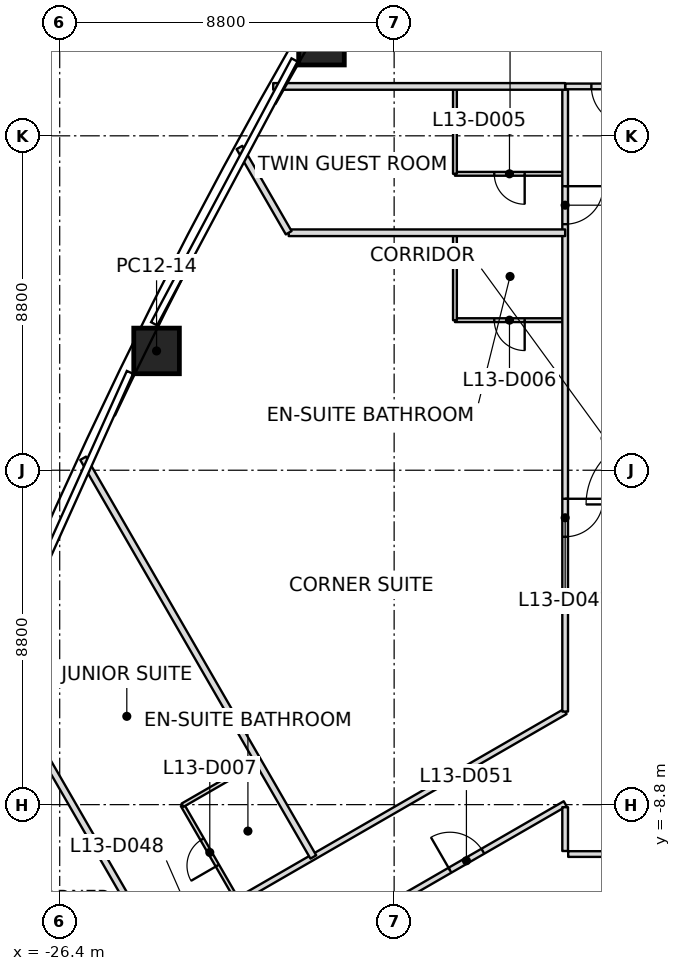
"""IFC4 building model, lengths in metres.
Left out: names, types, materials, properties, quantities, classifications, styles, units other than length and angle.
Written with IfcOpenShell. Run it as: python <this file> out.ifc"""

import sys

from ifc_helpers import new_model, si_unit, direction, frame, frame_2d, origin, origin_2d, place, context, subcontext, project, spatial, rectangle, extrude, element, fill, save


model = new_model("IFC4")
c1 = context("Model", 3, precision=1e-05, world=origin(), true_north=direction((0.0, 1.0)))
c2 = subcontext(c1, "Body", "Model", "MODEL_VIEW")
j1 = project(units=[si_unit("LENGTHUNIT", "METRE"), si_unit("PLANEANGLEUNIT", "RADIAN")], contexts=[c1])
p1 = place(None, origin())
s1 = spatial("IfcSite", under=j1, at=p1, CompositionType="ELEMENT")
p2 = place(p1, origin())
s2 = spatial("IfcBuilding", under=s1, at=p2, CompositionType="ELEMENT")
p3 = place(p2, frame((0.0, 0.0, 70.2)))
s3 = spatial("IfcBuildingStorey", under=s2, at=p3, CompositionType="ELEMENT", Elevation=70.2)
p4 = place(p3, frame((-19.512, 11.265, 0.0), z_axis=(0.010754701703, -0.006136118149, 0.999923339284), x_axis=(0.499971083262, 0.866042095943, -6.290806e-05)))
e1 = element("IfcColumn", 1, at=p4, inside=s3, PredefinedType="COLUMN", context=c2, shape_type="SweptSolid", body=[
    extrude(rectangle(XDim=1.2, YDim=1.2, at=origin_2d()), origin(), (0.0, 0.0, 1.0), 3.7),
])
p5 = place(p3, frame((-23.851, 3.139, 0.0), z_axis=(0.015306644787, 0.002309192102, 0.99988017995), x_axis=(0.441616967633, 0.897160209643, -0.00883244763)))
e2 = element("IfcColumn", 2, at=p5, inside=s3, PredefinedType="COLUMN", context=c2, shape_type="SweptSolid", body=[
    extrude(rectangle(XDim=1.2, YDim=1.2, at=origin_2d()), origin(), (0.0, 0.0, 1.0), 3.7),
])
p6 = place(p3, frame((-23.883, -12.577, 0.0), z_axis=(0.0, 0.0, 1.0), x_axis=(-0.500021453979, 0.866013016969, 0.0)))
e3 = element("IfcWall", 3, at=p6, inside=s3, PredefinedType="PARTITIONING", context=c2, shape_type="SweptSolid", body=[
    extrude(rectangle(XDim=8.576, YDim=0.175, at=frame_2d((4.288, 0.0))), origin(), (0.0, 0.0, 1.0), 2.784),
])
p7 = place(p3, frame((-19.727, -10.177, 0.0), z_axis=(0.0, 0.0, 1.0), x_axis=(-0.499992848968, 0.866029532395, 0.0)))
e4 = element("IfcWall", 4, at=p7, inside=s3, PredefinedType="PARTITIONING", context=c2, shape_type="SweptSolid", body=[
    extrude(rectangle(XDim=12.115, YDim=0.175, at=frame_2d((6.057, 0.0))), origin(), (0.0, 0.0, 1.0), 2.784),
])
p8 = place(p3, frame((-13.1, 6.249, 0.0), z_axis=(0.0, 0.0, 1.0), x_axis=(-1.0, 0.0, 0.0)))
e5 = element("IfcWall", 5, at=p8, inside=s3, PredefinedType="PARTITIONING", context=c2, shape_type="SweptSolid", body=[
    extrude(rectangle(XDim=7.274, YDim=0.175, at=frame_2d((3.637, 0.0))), origin(), (0.0, 0.0, 1.0), 3.0),
])
p9 = place(p3, frame((-20.375, 6.249, 0.0), z_axis=(0.0, 0.0, 1.0), x_axis=(-0.499999740363, 0.866025553686, 0.0)))
e6 = element("IfcWall", 6, at=p9, inside=s3, PredefinedType="PARTITIONING", context=c2, shape_type="SweptSolid", body=[
    extrude(rectangle(XDim=2.591, YDim=0.175, at=frame_2d((1.296, 0.0))), origin(), (0.0, 0.0, 1.0), 2.934),
])
p10 = place(p3, frame((-13.1, 10.1, 0.0), z_axis=(0.0, 0.0, 1.0), x_axis=(-1.0, 0.0, 0.0)))
e7 = element("IfcWall", 7, at=p10, inside=s3, PredefinedType="PARTITIONING", context=c2, shape_type="SweptSolid", body=[
    extrude(rectangle(XDim=7.682, YDim=0.175, at=frame_2d((3.841, 0.0))), origin(), (0.0, 0.0, 1.0), 2.934),
])
p11 = place(p3, frame((-13.1, -6.351, 0.0), z_axis=(0.0, 0.0, 1.0), x_axis=(-0.86602036638, -0.500008724938, 0.0)))
e8 = element("IfcWall", 8, at=p11, inside=s3, PredefinedType="PARTITIONING", context=c2, shape_type="SweptSolid", body=[
    extrude(rectangle(XDim=12.451, YDim=0.15, at=frame_2d((6.226, 0.0))), origin(), (0.0, 0.0, 1.0), 2.797),
])
p12 = place(p11, frame((10.752, 0.0, 0.0)))
e9 = element("IfcOpeningElement", 9, at=p12, cuts=e8, PredefinedType="OPENING", context=c2, shape_type="SweptSolid", body=[
    extrude(rectangle(XDim=1.0, YDim=2.1, at=frame_2d((0.5, 1.05))), frame((0.0, 0.075, 0.0), z_axis=(0.0, -1.0, 0.0), x_axis=(1.0, 0.0, 0.0)), (0.0, 0.0, 1.0), 0.15),
])
p13 = place(p3, frame((-22.764, -14.355, 0.0), z_axis=(0.0, 0.0, 1.0), x_axis=(0.866023822231, 0.500002739321, 0.0)))
e10 = element("IfcWall", 10, at=p13, inside=s3, PredefinedType="PARTITIONING", context=c2, shape_type="SweptSolid", body=[
    extrude(rectangle(XDim=11.159, YDim=0.15, at=frame_2d((5.58, 0.0))), origin(), (0.0, 0.0, 1.0), 2.797),
])
p14 = place(p13, frame((0.83, 0.0, 0.0)))
e11 = element("IfcOpeningElement", 11, at=p14, cuts=e10, PredefinedType="OPENING", context=c2, shape_type="SweptSolid", body=[
    extrude(rectangle(XDim=1.0, YDim=2.1, at=frame_2d((0.5, 1.05))), frame((0.0, 0.075, 0.0), z_axis=(0.0, -1.0, 0.0), x_axis=(1.0, 0.0, 0.0)), (0.0, 0.0, 1.0), 0.15),
])
p15 = place(p13, frame((7.659, 0.0, 0.0)))
e12 = element("IfcOpeningElement", 12, at=p15, cuts=e10, PredefinedType="OPENING", context=c2, shape_type="SweptSolid", body=[
    extrude(rectangle(XDim=1.0, YDim=2.1, at=frame_2d((0.5, 1.05))), frame((0.0, 0.075, 0.0), z_axis=(0.0, -1.0, 0.0), x_axis=(1.0, 0.0, 0.0)), (0.0, 0.0, 1.0), 0.15),
])
p16 = place(p3, frame((-13.1, -8.867, 0.0), z_axis=(0.0, 0.0, 1.0), x_axis=(0.0, -1.0, 0.0)))
e13 = element("IfcWall", 13, at=p16, inside=s3, PredefinedType="PARTITIONING", context=c2, shape_type="SweptSolid", body=[
    extrude(rectangle(XDim=1.153, YDim=0.15, at=frame_2d((0.576, 0.0))), origin(), (0.0, 0.0, 1.0), 2.797),
])
p17 = place(p3, frame((-13.1, 10.02, 0.0), z_axis=(0.0, 0.0, 1.0), x_axis=(0.0, -1.0, 0.0)))
e14 = element("IfcWall", 14, at=p17, inside=s3, PredefinedType="PARTITIONING", context=c2, shape_type="SweptSolid", body=[
    extrude(rectangle(XDim=16.371, YDim=0.15, at=frame_2d((8.186, 0.0))), origin(), (0.0, 0.0, 1.0), 3.0),
])
p18 = place(p17, frame((2.545, 0.0, 0.0)))
e15 = element("IfcOpeningElement", 15, at=p18, cuts=e14, PredefinedType="OPENING", context=c2, shape_type="SweptSolid", body=[
    extrude(rectangle(XDim=1.0, YDim=2.1, at=frame_2d((0.5, 1.05))), frame((0.0, 0.075, 0.0), z_axis=(0.0, -1.0, 0.0), x_axis=(1.0, 0.0, 0.0)), (0.0, 0.0, 1.0), 0.15),
])
p19 = place(p17, frame((10.771, 0.0, 0.0)))
e16 = element("IfcOpeningElement", 16, at=p19, cuts=e14, PredefinedType="OPENING", context=c2, shape_type="SweptSolid", body=[
    extrude(rectangle(XDim=1.0, YDim=2.1, at=frame_2d((0.5, 1.05))), frame((0.0, 0.075, 0.0), z_axis=(0.0, -1.0, 0.0), x_axis=(1.0, 0.0, 0.0)), (0.0, 0.0, 1.0), 0.15),
])
p20 = place(p3, frame((-4.18, 10.1, 0.0), z_axis=(0.0, 0.0, 1.0), x_axis=(-1.0, 0.0, 0.0)))
e17 = element("IfcWall", 17, at=p20, inside=s3, PredefinedType="PARTITIONING", context=c2, shape_type="SweptSolid", body=[
    extrude(rectangle(XDim=8.92, YDim=0.15, at=frame_2d((4.46, 0.0))), origin(), (0.0, 0.0, 1.0), 2.947),
])
p21 = place(p20, frame((7.23, 0.0, 0.0)))
e18 = element("IfcOpeningElement", 18, at=p21, cuts=e17, PredefinedType="OPENING", context=c2, shape_type="SweptSolid", body=[
    extrude(rectangle(XDim=1.0, YDim=2.1, at=frame_2d((0.5, 1.05))), frame((0.0, 0.075, 0.0), z_axis=(0.0, -1.0, 0.0), x_axis=(1.0, 0.0, 0.0)), (0.0, 0.0, 1.0), 0.15),
])
p22 = place(p3, frame((-13.02, -10.1, 0.0), z_axis=(0.0, 0.0, 1.0), x_axis=(1.0, 0.0, 0.0)))
e19 = element("IfcWall", 19, at=p22, inside=s3, PredefinedType="PARTITIONING", context=c2, shape_type="SweptSolid", body=[
    extrude(rectangle(XDim=26.04, YDim=0.15, at=frame_2d((13.02, 0.0))), origin(), (0.0, 0.0, 1.0), 2.797),
])
p23 = place(p22, frame((7.32, 0.0, 0.0)))
e20 = element("IfcOpeningElement", 20, at=p23, cuts=e19, PredefinedType="OPENING", context=c2, shape_type="SweptSolid", body=[
    extrude(rectangle(XDim=1.0, YDim=2.1, at=frame_2d((0.5, 1.05))), frame((0.0, 0.075, 0.0), z_axis=(0.0, -1.0, 0.0), x_axis=(1.0, 0.0, 0.0)), (0.0, 0.0, 1.0), 0.15),
])
p24 = place(p22, frame((11.82, 0.0, 0.0)))
e21 = element("IfcOpeningElement", 21, at=p24, cuts=e19, PredefinedType="OPENING", context=c2, shape_type="SweptSolid", body=[
    extrude(rectangle(XDim=1.0, YDim=2.1, at=frame_2d((0.5, 1.05))), frame((0.0, 0.075, 0.0), z_axis=(0.0, -1.0, 0.0), x_axis=(1.0, 0.0, 0.0)), (0.0, 0.0, 1.0), 0.15),
])
p25 = place(p22, frame((14.82, 0.0, 0.0)))
e22 = element("IfcOpeningElement", 22, at=p25, cuts=e19, PredefinedType="OPENING", context=c2, shape_type="SweptSolid", body=[
    extrude(rectangle(XDim=1.0, YDim=2.1, at=frame_2d((0.5, 1.05))), frame((0.0, 0.075, 0.0), z_axis=(0.0, -1.0, 0.0), x_axis=(1.0, 0.0, 0.0)), (0.0, 0.0, 1.0), 0.15),
])
p26 = place(p22, frame((19.92, 0.0, 0.0)))
e23 = element("IfcOpeningElement", 23, at=p26, cuts=e19, PredefinedType="OPENING", context=c2, shape_type="SweptSolid", body=[
    extrude(rectangle(XDim=1.0, YDim=2.1, at=frame_2d((0.5, 1.05))), frame((0.0, 0.075, 0.0), z_axis=(0.0, -1.0, 0.0), x_axis=(1.0, 0.0, 0.0)), (0.0, 0.0, 1.0), 0.15),
])
p27 = place(p3, frame((-21.733, -11.301, 0.0), z_axis=(0.0, 0.0, 1.0), x_axis=(-0.499999802827, 0.866025517622, 0.0)))
e24 = element("IfcWall", 24, at=p27, inside=s3, PredefinedType="PARTITIONING", context=c2, shape_type="SweptSolid", body=[
    extrude(rectangle(XDim=2.87, YDim=0.1, at=frame_2d((1.435, 0.0))), origin(), (0.0, 0.0, 1.0), 3.0),
])
p28 = place(p27, frame((1.035, 0.0, 0.0)))
e25 = element("IfcOpeningElement", 25, at=p28, cuts=e24, PredefinedType="OPENING", context=c2, shape_type="SweptSolid", body=[
    extrude(rectangle(XDim=0.8, YDim=2.1, at=frame_2d((0.4, 1.05))), frame((0.0, 0.05, 0.0), z_axis=(0.0, -1.0, 0.0), x_axis=(1.0, 0.0, 0.0)), (0.0, 0.0, 1.0), 0.1),
])
p29 = place(p3, frame((-23.168, -8.815, 0.0), z_axis=(0.0, 0.0, 1.0), x_axis=(0.866044110172, 0.499967598186, 0.0)))
e26 = element("IfcWall", 26, at=p29, inside=s3, PredefinedType="PARTITIONING", context=c2, shape_type="SweptSolid", body=[
    extrude(rectangle(XDim=2.27, YDim=0.1, at=frame_2d((1.135, 0.0))), origin(), (0.0, 0.0, 1.0), 3.0),
])
p30 = place(p3, frame((-13.13, 3.949, 0.0), z_axis=(0.0, 0.0, 1.0), x_axis=(-1.0, 0.0, 0.0)))
e27 = element("IfcWall", 27, at=p30, inside=s3, PredefinedType="PARTITIONING", context=c2, shape_type="SweptSolid", body=[
    extrude(rectangle(XDim=2.87, YDim=0.1, at=frame_2d((1.435, 0.0))), origin(), (0.0, 0.0, 1.0), 3.0),
])
p31 = place(p30, frame((1.035, 0.0, 0.0)))
e28 = element("IfcOpeningElement", 28, at=p31, cuts=e27, PredefinedType="OPENING", context=c2, shape_type="SweptSolid", body=[
    extrude(rectangle(XDim=0.8, YDim=2.1, at=frame_2d((0.4, 1.05))), frame((0.0, 0.05, 0.0), z_axis=(0.0, -1.0, 0.0), x_axis=(1.0, 0.0, 0.0)), (0.0, 0.0, 1.0), 0.1),
])
p32 = place(p3, frame((-16.0, 3.949, 0.0), z_axis=(0.0, 0.0, 1.0), x_axis=(0.0, 1.0, 0.0)))
e29 = element("IfcWall", 29, at=p32, inside=s3, PredefinedType="PARTITIONING", context=c2, shape_type="SweptSolid", body=[
    extrude(rectangle(XDim=2.27, YDim=0.1, at=frame_2d((1.135, 0.0))), origin(), (0.0, 0.0, 1.0), 3.0),
])
p33 = place(p3, frame((-13.13, 7.8, 0.0), z_axis=(0.0, 0.0, 1.0), x_axis=(-1.0, 0.0, 0.0)))
e30 = element("IfcWall", 30, at=p33, inside=s3, PredefinedType="PARTITIONING", context=c2, shape_type="SweptSolid", body=[
    extrude(rectangle(XDim=2.87, YDim=0.1, at=frame_2d((1.435, 0.0))), origin(), (0.0, 0.0, 1.0), 3.0),
])
p34 = place(p33, frame((1.035, 0.0, 0.0)))
e31 = element("IfcOpeningElement", 31, at=p34, cuts=e30, PredefinedType="OPENING", context=c2, shape_type="SweptSolid", body=[
    extrude(rectangle(XDim=0.8, YDim=2.1, at=frame_2d((0.4, 1.05))), frame((0.0, 0.05, 0.0), z_axis=(0.0, -1.0, 0.0), x_axis=(1.0, 0.0, 0.0)), (0.0, 0.0, 1.0), 0.1),
])
p35 = place(p3, frame((-16.0, 7.8, 0.0), z_axis=(0.0, 0.0, 1.0), x_axis=(0.0, 1.0, 0.0)))
e32 = element("IfcWall", 32, at=p35, inside=s3, PredefinedType="PARTITIONING", context=c2, shape_type="SweptSolid", body=[
    extrude(rectangle(XDim=2.27, YDim=0.1, at=frame_2d((1.135, 0.0))), origin(), (0.0, 0.0, 1.0), 3.0),
])
p36 = place(p21, origin())
e33 = element("IfcDoor", 33, at=p36, inside=s3, OperationType="SINGLE_SWING_LEFT", PredefinedType="DOOR", context=c2, shape_type="SweptSolid", body=[
    extrude(rectangle(XDim=1.0, YDim=2.1, at=frame_2d((0.5, 1.05))), frame((0.0, 0.025, 0.0), z_axis=(0.0, -1.0, 0.0), x_axis=(1.0, 0.0, 0.0)), (0.0, 0.0, 1.0), 0.05),
])
fill(e18, e33)
p37 = place(p18, origin())
e34 = element("IfcDoor", 34, at=p37, inside=s3, OperationType="SINGLE_SWING_LEFT", PredefinedType="DOOR", context=c2, shape_type="SweptSolid", body=[
    extrude(rectangle(XDim=1.0, YDim=2.1, at=frame_2d((0.5, 1.05))), frame((0.0, 0.025, 0.0), z_axis=(0.0, -1.0, 0.0), x_axis=(1.0, 0.0, 0.0)), (0.0, 0.0, 1.0), 0.05),
])
fill(e15, e34)
p38 = place(p34, origin())
e35 = element("IfcDoor", 35, at=p38, inside=s3, OperationType="SINGLE_SWING_LEFT", PredefinedType="DOOR", context=c2, shape_type="SweptSolid", body=[
    extrude(rectangle(XDim=0.8, YDim=2.1, at=frame_2d((0.4, 1.05))), frame((0.0, 0.025, 0.0), z_axis=(0.0, -1.0, 0.0), x_axis=(1.0, 0.0, 0.0)), (0.0, 0.0, 1.0), 0.05),
])
fill(e31, e35)
p39 = place(p19, origin())
e36 = element("IfcDoor", 36, at=p39, inside=s3, OperationType="SINGLE_SWING_RIGHT", PredefinedType="DOOR", context=c2, shape_type="SweptSolid", body=[
    extrude(rectangle(XDim=1.0, YDim=2.1, at=frame_2d((0.5, 1.05))), frame((0.0, 0.025, 0.0), z_axis=(0.0, -1.0, 0.0), x_axis=(1.0, 0.0, 0.0)), (0.0, 0.0, 1.0), 0.05),
])
fill(e16, e36)
p40 = place(p31, origin())
e37 = element("IfcDoor", 37, at=p40, inside=s3, OperationType="SINGLE_SWING_LEFT", PredefinedType="DOOR", context=c2, shape_type="SweptSolid", body=[
    extrude(rectangle(XDim=0.8, YDim=2.1, at=frame_2d((0.4, 1.05))), frame((0.0, 0.025, 0.0), z_axis=(0.0, -1.0, 0.0), x_axis=(1.0, 0.0, 0.0)), (0.0, 0.0, 1.0), 0.05),
])
fill(e28, e37)
p41 = place(p28, origin())
e38 = element("IfcDoor", 38, at=p41, inside=s3, OperationType="SINGLE_SWING_LEFT", PredefinedType="DOOR", context=c2, shape_type="SweptSolid", body=[
    extrude(rectangle(XDim=0.8, YDim=2.1, at=frame_2d((0.4, 1.05))), frame((0.0, 0.025, 0.0), z_axis=(0.0, -1.0, 0.0), x_axis=(1.0, 0.0, 0.0)), (0.0, 0.0, 1.0), 0.05),
])
fill(e25, e38)
p42 = place(p15, origin())
e39 = element("IfcDoor", 39, at=p42, inside=s3, OperationType="SINGLE_SWING_LEFT", PredefinedType="DOOR", context=c2, shape_type="SweptSolid", body=[
    extrude(rectangle(XDim=1.0, YDim=2.1, at=frame_2d((0.5, 1.05))), frame((0.0, 0.025, 0.0), z_axis=(0.0, -1.0, 0.0), x_axis=(1.0, 0.0, 0.0)), (0.0, 0.0, 1.0), 0.05),
])
fill(e12, e39)
save(model, sys.argv[1])
